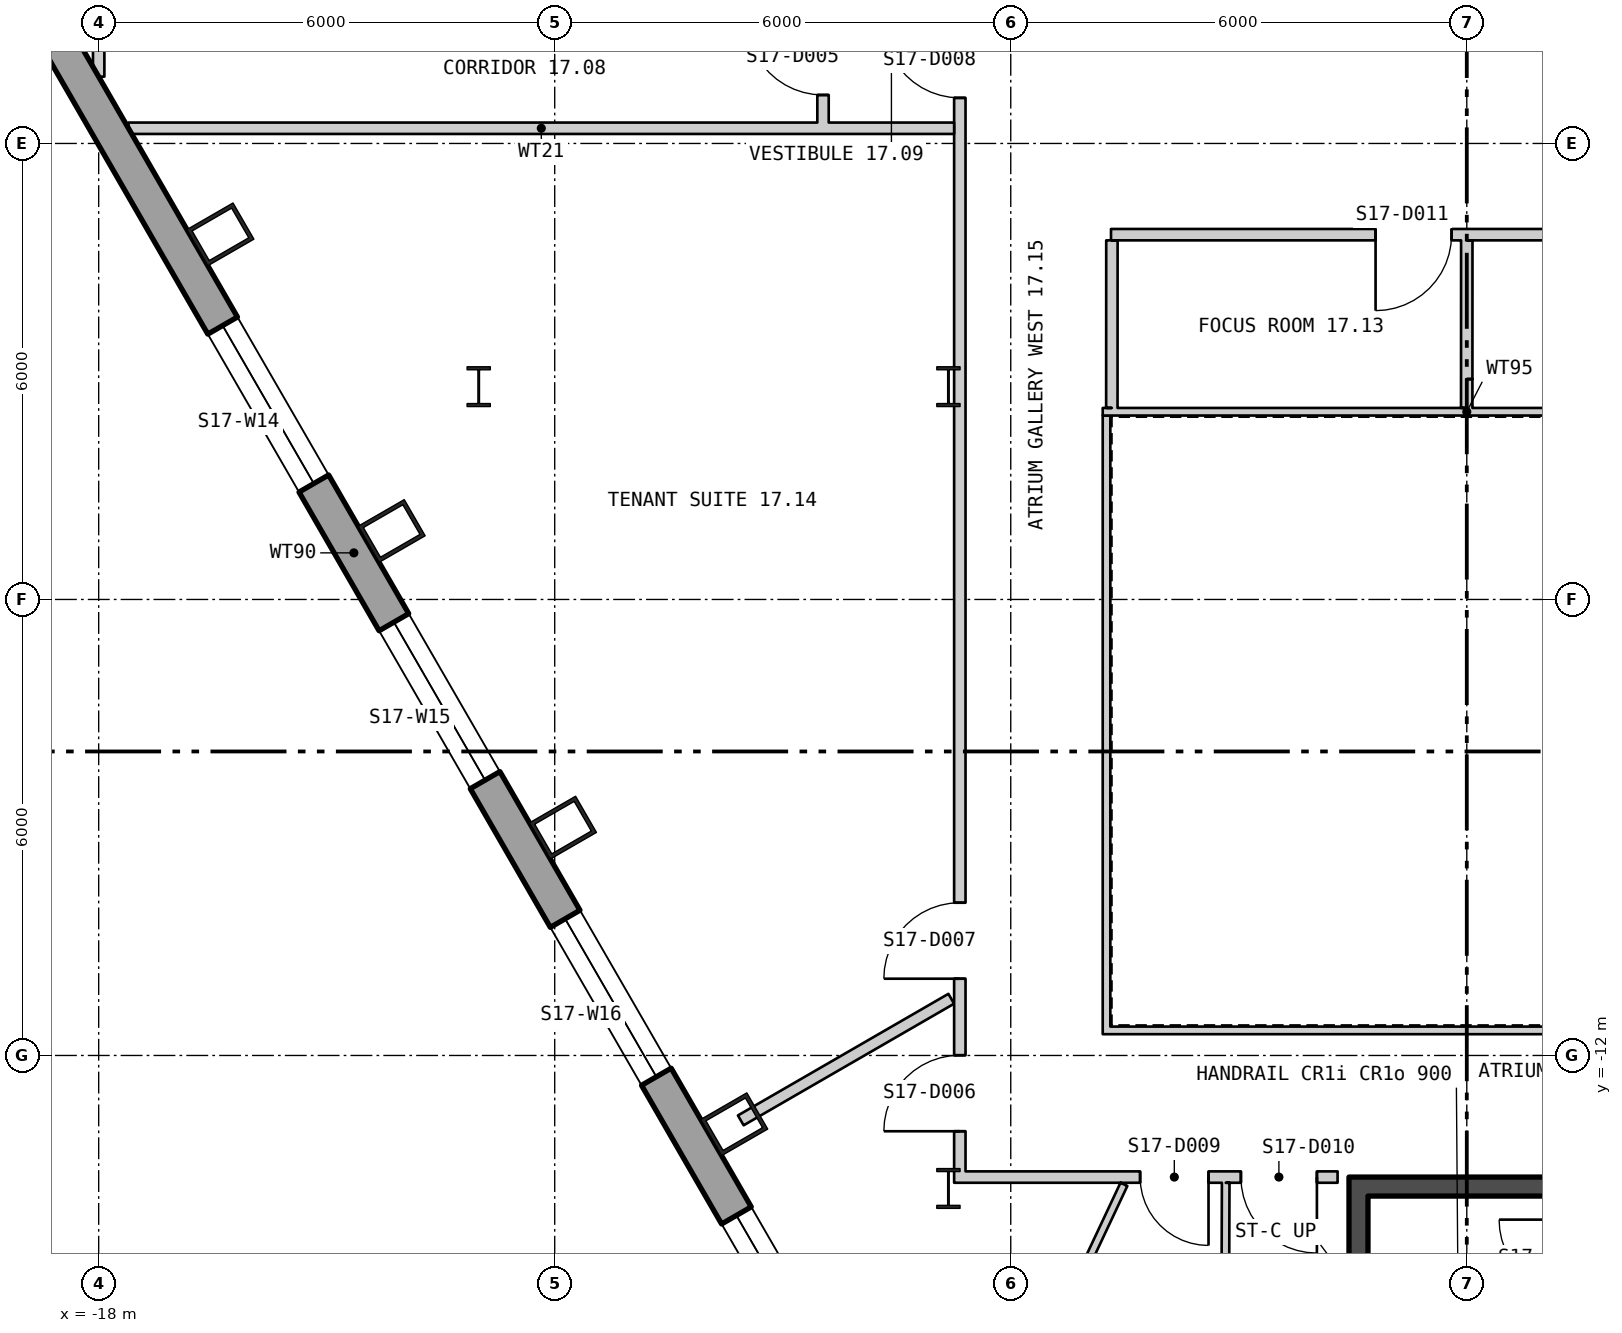
"""IFC4 building model, lengths in metres.
Left out: names, types, materials, properties, quantities, classifications, styles, units other than length and angle.
Written with IfcOpenShell. Run it as: python <this file> out.ifc"""

import sys

from ifc_helpers import new_model, si_unit, direction, frame, frame_2d, origin, origin_2d, place, context, subcontext, project, spatial, polyline, rectangle, hollow_rectangle, i_section, outline, extrude, element, fill, save


model = new_model("IFC4")
c1 = context("Model", 3, precision=1e-05, world=origin(), true_north=direction((0.0, 1.0)))
c2 = subcontext(c1, "Body", "Model", "MODEL_VIEW")
j1 = project(units=[si_unit("LENGTHUNIT", "METRE"), si_unit("PLANEANGLEUNIT", "RADIAN")], contexts=[c1])
p1 = place(None, origin())
s1 = spatial("IfcSite", under=j1, at=p1, CompositionType="ELEMENT")
p2 = place(p1, origin())
s2 = spatial("IfcBuilding", under=s1, at=p2, CompositionType="ELEMENT")
p3 = place(p2, frame((0.0, 0.0, 227.7)))
s3 = spatial("IfcBuildingStorey", under=s2, at=p3, CompositionType="ELEMENT", Elevation=227.7)
for number, where, z_axis, x_axis in (
    (1, (-16.398, -1.196, 0.0), (0.0, 0.0, 1.0), (0.5, -0.866, 0.0)),
    (2, (-14.145, -5.099, 0.0), (0.0, 0.0, 1.0), (0.5, -0.866, 0.0)),
    (3, (-11.891, -9.002, 0.0), (0.0, 0.0, 1.0), (0.5, -0.866, 0.0)),
    (4, (-9.638, -12.905, 0.0), (0.0, 0.0, 1.0), (0.5, -0.866, 0.0)),
):
    element("IfcColumn", number, at=place(p3, frame(where, z_axis=z_axis, x_axis=x_axis)), inside=s3, PredefinedType="COLUMN", context=c2, shape_type="SweptSolid", body=[
        extrude(hollow_rectangle(XDim=0.55, YDim=0.7, WallThickness=0.05, at=origin_2d()), origin(), (0.0, 0.0, 1.0), 3.9),
    ])
for number, where, z_axis, x_axis in (
    (5, (-6.82, -3.2, 0.0), (0.0, 0.0, 1.0), (1.0, 0.0, 0.0)),
    (6, (-6.82, -13.75, 0.0), (0.0, 0.0, 1.0), (1.0, 0.0, 0.0)),
    (7, (-13.0, -3.2, 0.0), (0.0, 0.0, 1.0), (1.0, 0.0, 0.0)),
):
    element("IfcColumn", number, at=place(p3, frame(where, z_axis=z_axis, x_axis=x_axis)), inside=s3, PredefinedType="COLUMN", context=c2, shape_type="SweptSolid", body=[
        extrude(i_section(OverallWidth=0.306, OverallDepth=0.524, WebThickness=0.021, FlangeThickness=0.04, at=origin_2d()), origin(), (0.0, 0.0, 1.0), 3.9),
    ])
p4 = place(p3, frame((-26.075, 14.415, -0.18), z_axis=(0.0, 0.0, 1.0), x_axis=(0.499999194392, -0.866025868902, 0.0)))
e8 = element("IfcWall", 8, at=p4, inside=s3, PredefinedType="SOLIDWALL", context=c2, shape_type="SweptSolid", body=[
    extrude(outline(polyline([(-0.13, -0.225), (45.86, -0.225), (45.6, 0.225), (0.13, 0.225), (-0.13, -0.225)])), origin(), (0.0, 0.0, 1.0), 3.68),
])
p5 = place(p4, frame((1.424, 0.0, 1.08)))
e9 = element("IfcOpeningElement", 9, at=p5, cuts=e8, PredefinedType="OPENING", context=c2, shape_type="SweptSolid", body=[
    extrude(rectangle(XDim=2.4, YDim=2.0, at=frame_2d((1.2, 1.0))), frame((0.0, 0.235, 0.0), z_axis=(0.0, -1.0, 0.0), x_axis=(1.0, 0.0, 0.0)), (0.0, 0.0, 1.0), 0.47),
])
p6 = place(p4, frame((5.892, 0.0, 1.08)))
e10 = element("IfcOpeningElement", 10, at=p6, cuts=e8, PredefinedType="OPENING", context=c2, shape_type="SweptSolid", body=[
    extrude(rectangle(XDim=2.4, YDim=2.0, at=frame_2d((1.2, 1.0))), frame((0.0, 0.235, 0.0), z_axis=(0.0, -1.0, 0.0), x_axis=(1.0, 0.0, 0.0)), (0.0, 0.0, 1.0), 0.47),
])
p7 = place(p4, frame((10.399, 0.0, 1.08)))
e11 = element("IfcOpeningElement", 11, at=p7, cuts=e8, PredefinedType="OPENING", context=c2, shape_type="SweptSolid", body=[
    extrude(rectangle(XDim=2.4, YDim=2.0, at=frame_2d((1.2, 1.0))), frame((0.0, 0.235, 0.0), z_axis=(0.0, -1.0, 0.0), x_axis=(1.0, 0.0, 0.0)), (0.0, 0.0, 1.0), 0.47),
])
p8 = place(p4, frame((19.412, 0.0, 1.08)))
e12 = element("IfcOpeningElement", 12, at=p8, cuts=e8, PredefinedType="OPENING", context=c2, shape_type="SweptSolid", body=[
    extrude(rectangle(XDim=2.4, YDim=2.0, at=frame_2d((1.2, 1.0))), frame((0.0, 0.235, 0.0), z_axis=(0.0, -1.0, 0.0), x_axis=(1.0, 0.0, 0.0)), (0.0, 0.0, 1.0), 0.47),
])
p9 = place(p4, frame((23.918, 0.0, 1.08)))
e13 = element("IfcOpeningElement", 13, at=p9, cuts=e8, PredefinedType="OPENING", context=c2, shape_type="SweptSolid", body=[
    extrude(rectangle(XDim=2.4, YDim=2.0, at=frame_2d((1.2, 1.0))), frame((0.0, 0.235, 0.0), z_axis=(0.0, -1.0, 0.0), x_axis=(1.0, 0.0, 0.0)), (0.0, 0.0, 1.0), 0.47),
])
p10 = place(p4, frame((28.425, 0.0, 1.08)))
e14 = element("IfcOpeningElement", 14, at=p10, cuts=e8, PredefinedType="OPENING", context=c2, shape_type="SweptSolid", body=[
    extrude(rectangle(XDim=2.4, YDim=2.0, at=frame_2d((1.2, 1.0))), frame((0.0, 0.235, 0.0), z_axis=(0.0, -1.0, 0.0), x_axis=(1.0, 0.0, 0.0)), (0.0, 0.0, 1.0), 0.47),
])
p11 = place(p4, frame((32.932, 0.0, 1.08)))
e15 = element("IfcOpeningElement", 15, at=p11, cuts=e8, PredefinedType="OPENING", context=c2, shape_type="SweptSolid", body=[
    extrude(rectangle(XDim=2.4, YDim=2.0, at=frame_2d((1.2, 1.0))), frame((0.0, 0.235, 0.0), z_axis=(0.0, -1.0, 0.0), x_axis=(1.0, 0.0, 0.0)), (0.0, 0.0, 1.0), 0.47),
])
p12 = place(p4, frame((41.907, 0.0, 1.08)))
e16 = element("IfcOpeningElement", 16, at=p12, cuts=e8, PredefinedType="OPENING", context=c2, shape_type="SweptSolid", body=[
    extrude(rectangle(XDim=2.4, YDim=2.0, at=frame_2d((1.2, 1.0))), frame((0.0, 0.235, 0.0), z_axis=(0.0, -1.0, 0.0), x_axis=(1.0, 0.0, 0.0)), (0.0, 0.0, 1.0), 0.47),
])
for number, where, z_axis, x_axis in (
    (17, (-4.79, -11.67, 0.0), (0.0, 0.0, 1.0), (1.0, 0.0, 0.0)),
    (18, (4.79, -3.53, 0.0), (0.0, 0.0, 1.0), (-1.0, 0.0, 0.0)),
):
    element("IfcWall", number, at=place(p3, frame(where, z_axis=z_axis, x_axis=x_axis)), inside=s3, PredefinedType="PARTITIONING", context=c2, shape_type="SweptSolid", body=[
        extrude(rectangle(XDim=9.58, YDim=0.1, at=frame_2d((4.79, 0.0))), origin(), (0.0, 0.0, 1.0), 3.7),
    ])
p13 = place(p3, frame((-4.74, -3.58, 0.0), z_axis=(0.0, 0.0, 1.0), x_axis=(0.0, -1.0, 0.0)))
e19 = element("IfcWall", 19, at=p13, inside=s3, PredefinedType="PARTITIONING", context=c2, shape_type="SweptSolid", body=[
    extrude(rectangle(XDim=8.04, YDim=0.1, at=frame_2d((4.02, 0.0))), origin(), (0.0, 0.0, 1.0), 3.7),
])
p14 = place(p3, frame((-1.425, -21.05, 0.0), z_axis=(0.0, 0.0, 1.0), x_axis=(0.0, 1.0, 0.0)))
e20 = element("IfcWall", 20, at=p14, inside=s3, PredefinedType="SHEAR", context=c2, shape_type="SweptSolid", body=[
    extrude(rectangle(XDim=7.2, YDim=0.25, at=frame_2d((3.6, 0.0))), origin(), (0.0, 0.0, 1.0), 3.7),
])
p15 = place(p3, frame((-1.55, -13.725, 0.0), z_axis=(0.0, 0.0, 1.0), x_axis=(1.0, 0.0, 0.0)))
e21 = element("IfcWall", 21, at=p15, inside=s3, PredefinedType="SHEAR", context=c2, shape_type="SweptSolid", body=[
    extrude(rectangle(XDim=3.1, YDim=0.25, at=frame_2d((1.55, 0.0))), origin(), (0.0, 0.0, 1.0), 3.7),
])
p16 = place(p3, frame((-18.0, 0.879, 0.0), z_axis=(0.0, 0.0, 1.0), x_axis=(0.0, 1.0, 0.0)))
e22 = element("IfcWall", 22, at=p16, inside=s3, PredefinedType="PARTITIONING", context=c2, shape_type="SweptSolid", body=[
    extrude(rectangle(XDim=12.579, YDim=0.15, at=frame_2d((6.29, 0.0))), origin(), (0.0, 0.0, 1.0), 3.7),
])
p17 = place(p16, frame((3.103, 0.0, 0.0)))
e23 = element("IfcOpeningElement", 23, at=p17, cuts=e22, PredefinedType="OPENING", context=c2, shape_type="SweptSolid", body=[
    extrude(rectangle(XDim=1.0, YDim=2.1, at=frame_2d((0.5, 1.05))), frame((0.0, 0.085, 0.0), z_axis=(0.0, -1.0, 0.0), x_axis=(1.0, 0.0, 0.0)), (0.0, 0.0, 1.0), 0.17),
])
p18 = place(p16, frame((7.608, 0.0, 0.0)))
e24 = element("IfcOpeningElement", 24, at=p18, cuts=e22, PredefinedType="OPENING", context=c2, shape_type="SweptSolid", body=[
    extrude(rectangle(XDim=1.0, YDim=2.1, at=frame_2d((0.5, 1.05))), frame((0.0, 0.085, 0.0), z_axis=(0.0, -1.0, 0.0), x_axis=(1.0, 0.0, 0.0)), (0.0, 0.0, 1.0), 0.17),
])
p19 = place(p3, frame((-17.608, 0.2, 0.0), z_axis=(0.0, 0.0, 1.0), x_axis=(1.0, 0.0, 0.0)))
e25 = element("IfcWall", 25, at=p19, inside=s3, PredefinedType="PARTITIONING", context=c2, shape_type="SweptSolid", body=[
    extrude(rectangle(XDim=10.863, YDim=0.15, at=frame_2d((5.431, 0.0))), origin(), (0.0, 0.0, 1.0), 3.7),
])
p20 = place(p3, frame((-9.552, -12.854, 0.0), z_axis=(0.0, 0.0, 1.0), x_axis=(0.865847012661, 0.500308855275, 0.0)))
e26 = element("IfcWall", 26, at=p20, inside=s3, PredefinedType="PARTITIONING", context=c2, shape_type="SweptSolid", body=[
    extrude(rectangle(XDim=3.198, YDim=0.15, at=frame_2d((1.599, 0.0))), origin(), (0.0, 0.0, 1.0), 3.7),
])
p21 = place(p3, frame((-8.47, 0.275, 0.0), z_axis=(0.0, 0.0, 1.0), x_axis=(0.0, 1.0, 0.0)))
e27 = element("IfcWall", 27, at=p21, inside=s3, PredefinedType="PARTITIONING", context=c2, shape_type="SweptSolid", body=[
    extrude(rectangle(XDim=1.725, YDim=0.15, at=frame_2d((0.863, 0.0))), origin(), (0.0, 0.0, 1.0), 3.7),
])
p22 = place(p21, frame((0.363, 0.0, 0.0)))
e28 = element("IfcOpeningElement", 28, at=p22, cuts=e27, PredefinedType="OPENING", context=c2, shape_type="SweptSolid", body=[
    extrude(rectangle(XDim=1.0, YDim=2.1, at=frame_2d((0.5, 1.05))), frame((0.0, 0.085, 0.0), z_axis=(0.0, -1.0, 0.0), x_axis=(1.0, 0.0, 0.0)), (0.0, 0.0, 1.0), 0.17),
])
p23 = place(p3, frame((-6.789, -18.539, 0.0), z_axis=(0.0, 0.0, 1.0), x_axis=(0.425635061069, 0.904894908146, 0.0)))
e29 = element("IfcWall", 29, at=p23, inside=s3, PredefinedType="PARTITIONING", context=c2, shape_type="SweptSolid", body=[
    extrude(rectangle(XDim=5.352, YDim=0.1, at=frame_2d((2.676, 0.0))), origin(), (0.0, 0.0, 1.0), 3.7),
])
p24 = place(p3, frame((-6.67, -13.675, 0.0), z_axis=(0.0, 0.0, 1.0), x_axis=(0.0, 1.0, 0.0)))
e30 = element("IfcWall", 30, at=p24, inside=s3, PredefinedType="PARTITIONING", context=c2, shape_type="SweptSolid", body=[
    extrude(rectangle(XDim=10.263, YDim=0.15, at=frame_2d((5.131, 0.0))), origin(), (0.0, 0.0, 1.0), 3.11),
])
p25 = place(p24, frame((0.678, 0.0, 0.0)))
e31 = element("IfcOpeningElement", 31, at=p25, cuts=e30, PredefinedType="OPENING", context=c2, shape_type="SweptSolid", body=[
    extrude(rectangle(XDim=1.0, YDim=2.1, at=frame_2d((0.5, 1.05))), frame((0.0, 0.085, 0.0), z_axis=(0.0, -1.0, 0.0), x_axis=(1.0, 0.0, 0.0)), (0.0, 0.0, 1.0), 0.17),
])
p26 = place(p24, frame((2.685, 0.0, 0.0)))
e32 = element("IfcOpeningElement", 32, at=p26, cuts=e30, PredefinedType="OPENING", context=c2, shape_type="SweptSolid", body=[
    extrude(rectangle(XDim=1.0, YDim=2.1, at=frame_2d((0.5, 1.05))), frame((0.0, 0.085, 0.0), z_axis=(0.0, -1.0, 0.0), x_axis=(1.0, 0.0, 0.0)), (0.0, 0.0, 1.0), 0.17),
])
p27 = place(p3, frame((-6.67, -3.412, 0.0), z_axis=(0.0, 0.0, 1.0), x_axis=(0.0, 1.0, 0.0)))
e33 = element("IfcWall", 33, at=p27, inside=s3, PredefinedType="PARTITIONING", context=c2, shape_type="SweptSolid", body=[
    extrude(rectangle(XDim=5.412, YDim=0.15, at=frame_2d((2.706, 0.0))), origin(), (0.0, 0.0, 1.0), 3.7),
])
p28 = place(p27, frame((4.012, 0.0, 0.0)))
e34 = element("IfcOpeningElement", 34, at=p28, cuts=e33, PredefinedType="OPENING", context=c2, shape_type="SweptSolid", body=[
    extrude(rectangle(XDim=1.0, YDim=2.1, at=frame_2d((0.5, 1.05))), frame((0.0, 0.085, 0.0), z_axis=(0.0, -1.0, 0.0), x_axis=(1.0, 0.0, 0.0)), (0.0, 0.0, 1.0), 0.17),
])
p29 = place(p3, frame((-6.595, -13.6, 0.0), z_axis=(0.0, 0.0, 1.0), x_axis=(1.0, 0.0, 0.0)))
e35 = element("IfcWall", 35, at=p29, inside=s3, PredefinedType="PARTITIONING", context=c2, shape_type="SweptSolid", body=[
    extrude(rectangle(XDim=4.895, YDim=0.15, at=frame_2d((2.447, 0.0))), origin(), (0.0, 0.0, 1.0), 2.91),
])
p30 = place(p29, frame((2.297, 0.0, 0.0)))
e36 = element("IfcOpeningElement", 36, at=p30, cuts=e35, PredefinedType="OPENING", context=c2, shape_type="SweptSolid", body=[
    extrude(rectangle(XDim=0.9, YDim=2.1, at=frame_2d((0.45, 1.05))), frame((0.0, 0.085, 0.0), z_axis=(0.0, -1.0, 0.0), x_axis=(1.0, 0.0, 0.0)), (0.0, 0.0, 1.0), 0.17),
])
p31 = place(p29, frame((3.623, 0.0, 0.0)))
e37 = element("IfcOpeningElement", 37, at=p31, cuts=e35, PredefinedType="OPENING", context=c2, shape_type="SweptSolid", body=[
    extrude(rectangle(XDim=1.0, YDim=2.1, at=frame_2d((0.5, 1.05))), frame((0.0, 0.085, 0.0), z_axis=(0.0, -1.0, 0.0), x_axis=(1.0, 0.0, 0.0)), (0.0, 0.0, 1.0), 0.17),
])
p32 = place(p3, frame((-4.681, -1.2, 0.0), z_axis=(0.0, 0.0, 1.0), x_axis=(1.0, 0.0, 0.0)))
e38 = element("IfcWall", 38, at=p32, inside=s3, PredefinedType="PARTITIONING", context=c2, shape_type="SweptSolid", body=[
    extrude(rectangle(XDim=11.426, YDim=0.15, at=frame_2d((5.713, 0.0))), origin(), (0.0, 0.0, 1.0), 3.7),
])
p33 = place(p32, frame((3.481, 0.0, 0.0)))
e39 = element("IfcOpeningElement", 39, at=p33, cuts=e38, PredefinedType="OPENING", context=c2, shape_type="SweptSolid", body=[
    extrude(rectangle(XDim=1.0, YDim=2.1, at=frame_2d((0.5, 1.05))), frame((0.0, 0.085, 0.0), z_axis=(0.0, -1.0, 0.0), x_axis=(1.0, 0.0, 0.0)), (0.0, 0.0, 1.0), 0.17),
])
p34 = place(p3, frame((-4.67, -3.48, 0.0), z_axis=(0.0, 0.0, 1.0), x_axis=(0.000453514693, 0.999999897162, 0.0)))
e40 = element("IfcWall", 40, at=p34, inside=s3, PredefinedType="PARTITIONING", context=c2, shape_type="SweptSolid", body=[
    extrude(rectangle(XDim=2.205, YDim=0.15, at=frame_2d((1.103, 0.0))), origin(), (0.0, 0.0, 1.0), 3.7),
])
p35 = place(p3, frame((-3.192, -19.591, 0.0), z_axis=(0.0, 0.0, 1.0), x_axis=(0.003380643291, 0.999994285609, 0.0)))
e41 = element("IfcWall", 41, at=p35, inside=s3, PredefinedType="PARTITIONING", context=c2, shape_type="SweptSolid", body=[
    extrude(rectangle(XDim=5.916, YDim=0.1, at=frame_2d((2.958, 0.0))), origin(), (0.0, 0.0, 1.0), 3.01),
])
p36 = place(p3, frame((-0.001, -3.48, 0.0), z_axis=(0.0, 0.0, 1.0), x_axis=(0.000526315717, 0.999999861496, 0.0)))
e42 = element("IfcWall", 42, at=p36, inside=s3, PredefinedType="PARTITIONING", context=c2, shape_type="SweptSolid", body=[
    extrude(rectangle(XDim=0.38, YDim=0.15, at=frame_2d((0.19, 0.0))), origin(), (0.0, 0.0, 1.0), 3.7),
])
p37 = place(p3, frame((-0.001, -3.1, 0.0), z_axis=(0.0, 0.0, 1.0), x_axis=(0.000438356122, 0.999999903922, 0.0)))
e43 = element("IfcWall", 43, at=p37, inside=s3, PredefinedType="PARTITIONING", context=c2, shape_type="SweptSolid", body=[
    extrude(rectangle(XDim=1.825, YDim=0.15, at=frame_2d((0.912, 0.0))), origin(), (0.0, 0.0, 1.0), 3.15),
])
p38 = place(p8, origin())
e44 = element("IfcWindow", 44, at=p38, inside=s3, PartitioningType="SINGLE_PANEL", PredefinedType="WINDOW", context=c2, shape_type="SweptSolid", body=[
    extrude(rectangle(XDim=2.4, YDim=2.0, at=frame_2d((1.2, 1.0))), frame((0.0, 0.105, 0.0), z_axis=(0.0, -1.0, 0.0), x_axis=(1.0, 0.0, 0.0)), (0.0, 0.0, 1.0), 0.06),
])
fill(e12, e44)
p39 = place(p9, origin())
e45 = element("IfcWindow", 45, at=p39, inside=s3, PartitioningType="SINGLE_PANEL", PredefinedType="WINDOW", context=c2, shape_type="SweptSolid", body=[
    extrude(rectangle(XDim=2.4, YDim=2.0, at=frame_2d((1.2, 1.0))), frame((0.0, 0.105, 0.0), z_axis=(0.0, -1.0, 0.0), x_axis=(1.0, 0.0, 0.0)), (0.0, 0.0, 1.0), 0.06),
])
fill(e13, e45)
p40 = place(p10, origin())
e46 = element("IfcWindow", 46, at=p40, inside=s3, PartitioningType="SINGLE_PANEL", PredefinedType="WINDOW", context=c2, shape_type="SweptSolid", body=[
    extrude(rectangle(XDim=2.4, YDim=2.0, at=frame_2d((1.2, 1.0))), frame((0.0, 0.105, 0.0), z_axis=(0.0, -1.0, 0.0), x_axis=(1.0, 0.0, 0.0)), (0.0, 0.0, 1.0), 0.06),
])
fill(e14, e46)
p41 = place(p11, origin())
e47 = element("IfcWindow", 47, at=p41, inside=s3, PartitioningType="SINGLE_PANEL", PredefinedType="WINDOW", context=c2, shape_type="SweptSolid", body=[
    extrude(rectangle(XDim=2.4, YDim=2.0, at=frame_2d((1.2, 1.0))), frame((0.0, 0.105, 0.0), z_axis=(0.0, -1.0, 0.0), x_axis=(1.0, 0.0, 0.0)), (0.0, 0.0, 1.0), 0.06),
])
fill(e15, e47)
p42 = place(p22, origin())
e48 = element("IfcDoor", 48, at=p42, inside=s3, OperationType="SINGLE_SWING_LEFT", PredefinedType="DOOR", context=c2, shape_type="SweptSolid", body=[
    extrude(rectangle(XDim=1.0, YDim=2.1, at=frame_2d((0.5, 1.05))), frame((0.0, 0.025, 0.0), z_axis=(0.0, -1.0, 0.0), x_axis=(1.0, 0.0, 0.0)), (0.0, 0.0, 1.0), 0.05),
])
fill(e28, e48)
p43 = place(p25, origin())
e49 = element("IfcDoor", 49, at=p43, inside=s3, OperationType="SINGLE_SWING_RIGHT", PredefinedType="DOOR", context=c2, shape_type="SweptSolid", body=[
    extrude(rectangle(XDim=1.0, YDim=2.1, at=frame_2d((0.5, 1.05))), frame((0.0, 0.025, 0.0), z_axis=(0.0, -1.0, 0.0), x_axis=(1.0, 0.0, 0.0)), (0.0, 0.0, 1.0), 0.05),
])
fill(e31, e49)
p44 = place(p26, origin())
e50 = element("IfcDoor", 50, at=p44, inside=s3, OperationType="SINGLE_SWING_RIGHT", PredefinedType="DOOR", context=c2, shape_type="SweptSolid", body=[
    extrude(rectangle(XDim=1.0, YDim=2.1, at=frame_2d((0.5, 1.05))), frame((0.0, 0.025, 0.0), z_axis=(0.0, -1.0, 0.0), x_axis=(1.0, 0.0, 0.0)), (0.0, 0.0, 1.0), 0.05),
])
fill(e32, e50)
p45 = place(p28, origin())
e51 = element("IfcDoor", 51, at=p45, inside=s3, OperationType="SINGLE_SWING_LEFT", PredefinedType="DOOR", context=c2, shape_type="SweptSolid", body=[
    extrude(rectangle(XDim=1.0, YDim=2.1, at=frame_2d((0.5, 1.05))), frame((0.0, 0.025, 0.0), z_axis=(0.0, -1.0, 0.0), x_axis=(1.0, 0.0, 0.0)), (0.0, 0.0, 1.0), 0.05),
])
fill(e34, e51)
p46 = place(p30, origin())
e52 = element("IfcDoor", 52, at=p46, inside=s3, OperationType="SINGLE_SWING_RIGHT", PredefinedType="DOOR", context=c2, shape_type="SweptSolid", body=[
    extrude(rectangle(XDim=0.9, YDim=2.1, at=frame_2d((0.45, 1.05))), frame((0.0, 0.025, 0.0), z_axis=(0.0, -1.0, 0.0), x_axis=(1.0, 0.0, 0.0)), (0.0, 0.0, 1.0), 0.05),
])
fill(e36, e52)
p47 = place(p31, origin())
e53 = element("IfcDoor", 53, at=p47, inside=s3, OperationType="SINGLE_SWING_RIGHT", PredefinedType="DOOR", context=c2, shape_type="SweptSolid", body=[
    extrude(rectangle(XDim=1.0, YDim=2.1, at=frame_2d((0.5, 1.05))), frame((0.0, 0.025, 0.0), z_axis=(0.0, -1.0, 0.0), x_axis=(1.0, 0.0, 0.0)), (0.0, 0.0, 1.0), 0.05),
])
fill(e37, e53)
p48 = place(p33, origin())
e54 = element("IfcDoor", 54, at=p48, inside=s3, OperationType="SINGLE_SWING_LEFT", PredefinedType="DOOR", context=c2, shape_type="SweptSolid", body=[
    extrude(rectangle(XDim=1.0, YDim=2.1, at=frame_2d((0.5, 1.05))), frame((0.0, 0.025, 0.0), z_axis=(0.0, -1.0, 0.0), x_axis=(1.0, 0.0, 0.0)), (0.0, 0.0, 1.0), 0.05),
])
fill(e39, e54)
save(model, sys.argv[1])
